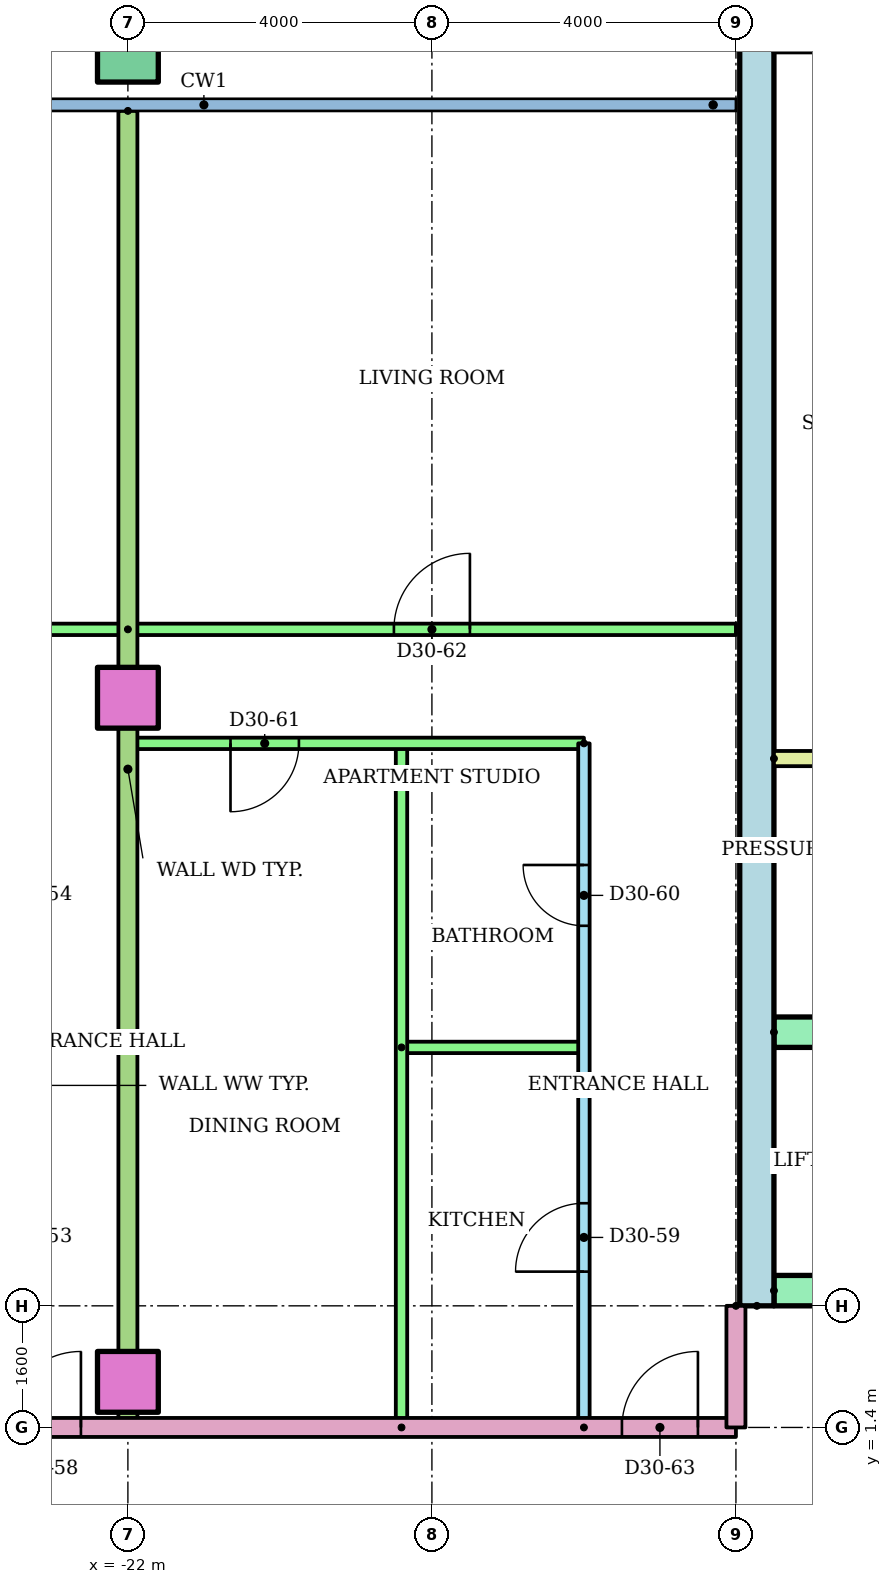
"""IFC4 building model, lengths in metres.
Left out: names, types, materials, properties, quantities, classifications, styles, units other than length and angle.
Written with IfcOpenShell. Run it as: python <this file> out.ifc"""

import sys

from ifc_helpers import new_model, si_unit, direction, frame, frame_2d, origin, origin_2d, place, context, subcontext, project, spatial, rectangle, hollow_rectangle, extrude, element, fill, save


model = new_model("IFC4")
c1 = context("Model", 3, precision=1e-05, world=origin(), true_north=direction((0.0, 1.0)))
c2 = subcontext(c1, "Body", "Model", "MODEL_VIEW")
j1 = project(units=[si_unit("LENGTHUNIT", "METRE"), si_unit("PLANEANGLEUNIT", "RADIAN")], contexts=[c1])
p1 = place(None, origin())
s1 = spatial("IfcSite", under=j1, at=p1, CompositionType="ELEMENT")
p2 = place(p1, origin())
s2 = spatial("IfcBuilding", under=s1, at=p2, CompositionType="ELEMENT")
p3 = place(p2, frame((0.0, 0.0, 119.8)))
s3 = spatial("IfcBuildingStorey", under=s2, at=p3, CompositionType="ELEMENT", Elevation=119.8)
for number, where in (
    (1, (-22.0, 2.0, 0.0)),
    (2, (-22.0, 11.0, 0.0)),
):
    element("IfcColumn", number, at=place(p3, frame(where)), inside=s3, PredefinedType="COLUMN", context=c2, shape_type="SweptSolid", body=[
        extrude(rectangle(XDim=0.8, YDim=0.8, at=origin_2d()), origin(), (0.0, 0.0, 1.0), 3.2),
    ])
p4 = place(p3, frame((-22.0, 19.5, 0.0)))
e3 = element("IfcColumn", 3, at=p4, inside=s3, PredefinedType="COLUMN", context=c2, shape_type="SweptSolid", body=[
    extrude(hollow_rectangle(XDim=0.8, YDim=0.8, WallThickness=0.04, at=origin_2d()), origin(), (0.0, 0.0, 1.0), 3.2),
])
p5 = place(p3, frame((-13.725, 3.0, 0.0), z_axis=(0.0, 0.0, 1.0), x_axis=(0.0, 1.0, 0.0)))
e4 = element("IfcWall", 4, at=p5, inside=s3, PredefinedType="SHEAR", context=c2, shape_type="SweptSolid", body=[
    extrude(rectangle(XDim=17.0, YDim=0.45, at=frame_2d((8.5, 0.0))), origin(), (0.0, 0.0, 1.0), 2.92),
])
p6 = place(p3, frame((-13.5, 3.2, 0.0)))
e5 = element("IfcWall", 5, at=p6, inside=s3, PredefinedType="SHEAR", context=c2, shape_type="SweptSolid", body=[
    extrude(rectangle(XDim=27.0, YDim=0.4, at=frame_2d((13.5, 0.0))), origin(), (0.0, 0.0, 1.0), 2.92),
])
p7 = place(p6, frame((6.861, 0.0, 0.0)))
e6 = element("IfcOpeningElement", 6, at=p7, cuts=e5, PredefinedType="OPENING", context=c2, shape_type="SweptSolid", body=[
    extrude(rectangle(XDim=1.1, YDim=2.1, at=frame_2d((0.55, 1.05))), frame((0.0, 0.21, 0.0), z_axis=(0.0, -1.0, 0.0), x_axis=(1.0, 0.0, 0.0)), (0.0, 0.0, 1.0), 0.42),
])
p8 = place(p6, frame((9.906, 0.0, 0.0)))
e7 = element("IfcOpeningElement", 7, at=p8, cuts=e5, PredefinedType="OPENING", context=c2, shape_type="SweptSolid", body=[
    extrude(rectangle(XDim=1.1, YDim=2.1, at=frame_2d((0.55, 1.05))), frame((0.0, 0.21, 0.0), z_axis=(0.0, -1.0, 0.0), x_axis=(1.0, 0.0, 0.0)), (0.0, 0.0, 1.0), 0.42),
])
p9 = place(p6, frame((15.994, 0.0, 0.0)))
e8 = element("IfcOpeningElement", 8, at=p9, cuts=e5, PredefinedType="OPENING", context=c2, shape_type="SweptSolid", body=[
    extrude(rectangle(XDim=1.1, YDim=2.1, at=frame_2d((0.55, 1.05))), frame((0.0, 0.21, 0.0), z_axis=(0.0, -1.0, 0.0), x_axis=(1.0, 0.0, 0.0)), (0.0, 0.0, 1.0), 0.42),
])
p10 = place(p6, frame((19.039, 0.0, 0.0)))
e9 = element("IfcOpeningElement", 9, at=p10, cuts=e5, PredefinedType="OPENING", context=c2, shape_type="SweptSolid", body=[
    extrude(rectangle(XDim=1.1, YDim=2.1, at=frame_2d((0.55, 1.05))), frame((0.0, 0.21, 0.0), z_axis=(0.0, -1.0, 0.0), x_axis=(1.0, 0.0, 0.0)), (0.0, 0.0, 1.0), 0.42),
])
p11 = place(p6, frame((12.6, 0.0, 0.0)))
e10 = element("IfcOpeningElement", 10, at=p11, cuts=e5, PredefinedType="OPENING", context=c2, shape_type="SweptSolid", body=[
    extrude(rectangle(XDim=1.8, YDim=2.1, at=frame_2d((0.9, 1.05))), frame((0.0, 0.21, 0.0), z_axis=(0.0, -1.0, 0.0), x_axis=(1.0, 0.0, 0.0)), (0.0, 0.0, 1.0), 0.42),
])
p12 = place(p3, frame((-13.5, 6.6, 0.0)))
e11 = element("IfcWall", 11, at=p12, inside=s3, PredefinedType="SHEAR", context=c2, shape_type="SweptSolid", body=[
    extrude(rectangle(XDim=11.978, YDim=0.4, at=frame_2d((5.989, 0.0))), origin(), (0.0, 0.0, 1.0), 2.92),
])
p13 = place(p3, frame((-13.5, 10.2, 0.0)))
e12 = element("IfcWall", 12, at=p13, inside=s3, PredefinedType="PARTITIONING", context=c2, shape_type="SweptSolid", body=[
    extrude(rectangle(XDim=3.9, YDim=0.2, at=frame_2d((1.95, 0.0))), origin(), (0.0, 0.0, 1.0), 2.92),
])
p14 = place(p3, frame((-32.72, 11.9, 0.0)))
e13 = element("IfcWall", 13, at=p14, inside=s3, PredefinedType="PARTITIONING", context=c2, shape_type="SweptSolid", body=[
    extrude(rectangle(XDim=10.72, YDim=0.15, at=frame_2d((5.36, 0.0))), origin(), (0.0, 0.0, 1.0), 2.4),
])
p15 = place(p14, frame((1.102, 0.0, 0.0)))
e14 = element("IfcOpeningElement", 14, at=p15, cuts=e13, PredefinedType="OPENING", context=c2, shape_type="SweptSolid", body=[
    extrude(rectangle(XDim=1.0, YDim=2.1, at=frame_2d((0.5, 1.05))), frame((0.0, 0.085, 0.0), z_axis=(0.0, -1.0, 0.0), x_axis=(1.0, 0.0, 0.0)), (0.0, 0.0, 1.0), 0.17),
])
p16 = place(p14, frame((7.22, 0.0, 0.0)))
e15 = element("IfcOpeningElement", 15, at=p16, cuts=e13, PredefinedType="OPENING", context=c2, shape_type="SweptSolid", body=[
    extrude(rectangle(XDim=1.0, YDim=2.1, at=frame_2d((0.5, 1.05))), frame((0.0, 0.085, 0.0), z_axis=(0.0, -1.0, 0.0), x_axis=(1.0, 0.0, 0.0)), (0.0, 0.0, 1.0), 0.17),
])
p17 = place(p3, frame((-16.0, 1.4, 0.0), z_axis=(0.0, 0.0, 1.0), x_axis=(0.0, 1.0, 0.0)))
e16 = element("IfcWall", 16, at=p17, inside=s3, PredefinedType="PARTITIONING", context=c2, shape_type="SweptSolid", body=[
    extrude(rectangle(XDim=9.0, YDim=0.15, at=frame_2d((4.5, 0.0))), origin(), (0.0, 0.0, 1.0), 2.4),
])
p18 = place(p17, frame((2.05, 0.0, 0.0)))
e17 = element("IfcOpeningElement", 17, at=p18, cuts=e16, PredefinedType="OPENING", context=c2, shape_type="SweptSolid", body=[
    extrude(rectangle(XDim=0.9, YDim=2.1, at=frame_2d((0.45, 1.05))), frame((0.0, 0.085, 0.0), z_axis=(0.0, -1.0, 0.0), x_axis=(1.0, 0.0, 0.0)), (0.0, 0.0, 1.0), 0.17),
])
p19 = place(p17, frame((6.6, 0.0, 0.0)))
e18 = element("IfcOpeningElement", 18, at=p19, cuts=e16, PredefinedType="OPENING", context=c2, shape_type="SweptSolid", body=[
    extrude(rectangle(XDim=0.8, YDim=2.1, at=frame_2d((0.4, 1.05))), frame((0.0, 0.085, 0.0), z_axis=(0.0, -1.0, 0.0), x_axis=(1.0, 0.0, 0.0)), (0.0, 0.0, 1.0), 0.17),
])
p20 = place(p3, frame((-18.4, 6.4, 0.0)))
e19 = element("IfcWall", 19, at=p20, inside=s3, PredefinedType="PARTITIONING", context=c2, shape_type="SweptSolid", body=[
    extrude(rectangle(XDim=2.4, YDim=0.15, at=frame_2d((1.2, 0.0))), origin(), (0.0, 0.0, 1.0), 2.4),
])
p21 = place(p3, frame((-18.4, 1.4, 0.0), z_axis=(0.0, 0.0, 1.0), x_axis=(0.0, 1.0, 0.0)))
e20 = element("IfcWall", 20, at=p21, inside=s3, PredefinedType="PARTITIONING", context=c2, shape_type="SweptSolid", body=[
    extrude(rectangle(XDim=9.0, YDim=0.15, at=frame_2d((4.5, 0.0))), origin(), (0.0, 0.0, 1.0), 2.4),
])
p22 = place(p3, frame((-16.0, 10.4, 0.0), z_axis=(0.0, 0.0, 1.0), x_axis=(-1.0, 0.0, 0.0)))
e21 = element("IfcWall", 21, at=p22, inside=s3, PredefinedType="PARTITIONING", context=c2, shape_type="SweptSolid", body=[
    extrude(rectangle(XDim=6.0, YDim=0.15, at=frame_2d((3.0, 0.0))), origin(), (0.0, 0.0, 1.0), 2.4),
])
p23 = place(p22, frame((3.75, 0.0, 0.0)))
e22 = element("IfcOpeningElement", 22, at=p23, cuts=e21, PredefinedType="OPENING", context=c2, shape_type="SweptSolid", body=[
    extrude(rectangle(XDim=0.9, YDim=2.1, at=frame_2d((0.45, 1.05))), frame((0.0, 0.085, 0.0), z_axis=(0.0, -1.0, 0.0), x_axis=(1.0, 0.0, 0.0)), (0.0, 0.0, 1.0), 0.17),
])
p24 = place(p3, frame((-22.0, 11.9, 0.0)))
e23 = element("IfcWall", 23, at=p24, inside=s3, PredefinedType="PARTITIONING", context=c2, shape_type="SweptSolid", body=[
    extrude(rectangle(XDim=8.0, YDim=0.15, at=frame_2d((4.0, 0.0))), origin(), (0.0, 0.0, 1.0), 2.4),
])
p25 = place(p24, frame((3.5, 0.0, 0.0)))
e24 = element("IfcOpeningElement", 24, at=p25, cuts=e23, PredefinedType="OPENING", context=c2, shape_type="SweptSolid", body=[
    extrude(rectangle(XDim=1.0, YDim=2.1, at=frame_2d((0.5, 1.05))), frame((0.0, 0.085, 0.0), z_axis=(0.0, -1.0, 0.0), x_axis=(1.0, 0.0, 0.0)), (0.0, 0.0, 1.0), 0.17),
])
p26 = place(p3, frame((-22.0, 18.721, 0.0), z_axis=(0.0, 0.0, 1.0), x_axis=(0.0, -1.0, 0.0)))
e25 = element("IfcWall", 25, at=p26, inside=s3, PredefinedType="PARTITIONING", context=c2, shape_type="SweptSolid", body=[
    extrude(rectangle(XDim=17.321, YDim=0.25, at=frame_2d((8.661, 0.0))), origin(), (0.0, 0.0, 1.0), 2.4),
])
p27 = place(p3, frame((-29.0, 1.4, 0.0)))
e26 = element("IfcWall", 26, at=p27, inside=s3, PredefinedType="PARTITIONING", context=c2, shape_type="SweptSolid", body=[
    extrude(rectangle(XDim=15.0, YDim=0.25, at=frame_2d((7.5, 0.0))), origin(), (0.0, 0.0, 1.0), 2.4),
])
p28 = place(p27, frame((5.382, 0.0, 0.0)))
e27 = element("IfcOpeningElement", 27, at=p28, cuts=e26, PredefinedType="OPENING", context=c2, shape_type="SweptSolid", body=[
    extrude(rectangle(XDim=1.0, YDim=2.1, at=frame_2d((0.5, 1.05))), frame((0.0, 0.135, 0.0), z_axis=(0.0, -1.0, 0.0), x_axis=(1.0, 0.0, 0.0)), (0.0, 0.0, 1.0), 0.27),
])
p29 = place(p27, frame((13.5, 0.0, 0.0)))
e28 = element("IfcOpeningElement", 28, at=p29, cuts=e26, PredefinedType="OPENING", context=c2, shape_type="SweptSolid", body=[
    extrude(rectangle(XDim=1.0, YDim=2.1, at=frame_2d((0.5, 1.05))), frame((0.0, 0.135, 0.0), z_axis=(0.0, -1.0, 0.0), x_axis=(1.0, 0.0, 0.0)), (0.0, 0.0, 1.0), 0.27),
])
p30 = place(p3, frame((-14.0, 3.0, 0.0), z_axis=(0.0, 0.0, 1.0), x_axis=(0.0, -1.0, 0.0)))
e29 = element("IfcWall", 29, at=p30, inside=s3, PredefinedType="PARTITIONING", context=c2, shape_type="SweptSolid", body=[
    extrude(rectangle(XDim=1.6, YDim=0.25, at=frame_2d((0.8, 0.0))), origin(), (0.0, 0.0, 1.0), 2.4),
])
p31 = place(p28, origin())
e30 = element("IfcDoor", 30, at=p31, inside=s3, OperationType="SINGLE_SWING_RIGHT", PredefinedType="DOOR", context=c2, shape_type="SweptSolid", body=[
    extrude(rectangle(XDim=1.0, YDim=2.1, at=frame_2d((0.5, 1.05))), frame((0.0, 0.025, 0.0), z_axis=(0.0, -1.0, 0.0), x_axis=(1.0, 0.0, 0.0)), (0.0, 0.0, 1.0), 0.05),
])
fill(e27, e30)
p32 = place(p18, origin())
e31 = element("IfcDoor", 31, at=p32, inside=s3, OperationType="SINGLE_SWING_LEFT", PredefinedType="DOOR", context=c2, shape_type="SweptSolid", body=[
    extrude(rectangle(XDim=0.9, YDim=2.1, at=frame_2d((0.45, 1.05))), frame((0.0, 0.025, 0.0), z_axis=(0.0, -1.0, 0.0), x_axis=(1.0, 0.0, 0.0)), (0.0, 0.0, 1.0), 0.05),
])
fill(e17, e31)
p33 = place(p19, origin())
e32 = element("IfcDoor", 32, at=p33, inside=s3, OperationType="SINGLE_SWING_RIGHT", PredefinedType="DOOR", context=c2, shape_type="SweptSolid", body=[
    extrude(rectangle(XDim=0.8, YDim=2.1, at=frame_2d((0.4, 1.05))), frame((0.0, 0.025, 0.0), z_axis=(0.0, -1.0, 0.0), x_axis=(1.0, 0.0, 0.0)), (0.0, 0.0, 1.0), 0.05),
])
fill(e18, e32)
p34 = place(p23, origin())
e33 = element("IfcDoor", 33, at=p34, inside=s3, OperationType="SINGLE_SWING_RIGHT", PredefinedType="DOOR", context=c2, shape_type="SweptSolid", body=[
    extrude(rectangle(XDim=0.9, YDim=2.1, at=frame_2d((0.45, 1.05))), frame((0.0, 0.025, 0.0), z_axis=(0.0, -1.0, 0.0), x_axis=(1.0, 0.0, 0.0)), (0.0, 0.0, 1.0), 0.05),
])
fill(e22, e33)
p35 = place(p25, origin())
e34 = element("IfcDoor", 34, at=p35, inside=s3, OperationType="SINGLE_SWING_RIGHT", PredefinedType="DOOR", context=c2, shape_type="SweptSolid", body=[
    extrude(rectangle(XDim=1.0, YDim=2.1, at=frame_2d((0.5, 1.05))), frame((0.0, 0.025, 0.0), z_axis=(0.0, -1.0, 0.0), x_axis=(1.0, 0.0, 0.0)), (0.0, 0.0, 1.0), 0.05),
])
fill(e24, e34)
p36 = place(p29, origin())
e35 = element("IfcDoor", 35, at=p36, inside=s3, OperationType="SINGLE_SWING_RIGHT", PredefinedType="DOOR", context=c2, shape_type="SweptSolid", body=[
    extrude(rectangle(XDim=1.0, YDim=2.1, at=frame_2d((0.5, 1.05))), frame((0.0, 0.025, 0.0), z_axis=(0.0, -1.0, 0.0), x_axis=(1.0, 0.0, 0.0)), (0.0, 0.0, 1.0), 0.05),
])
fill(e28, e35)
save(model, sys.argv[1])
